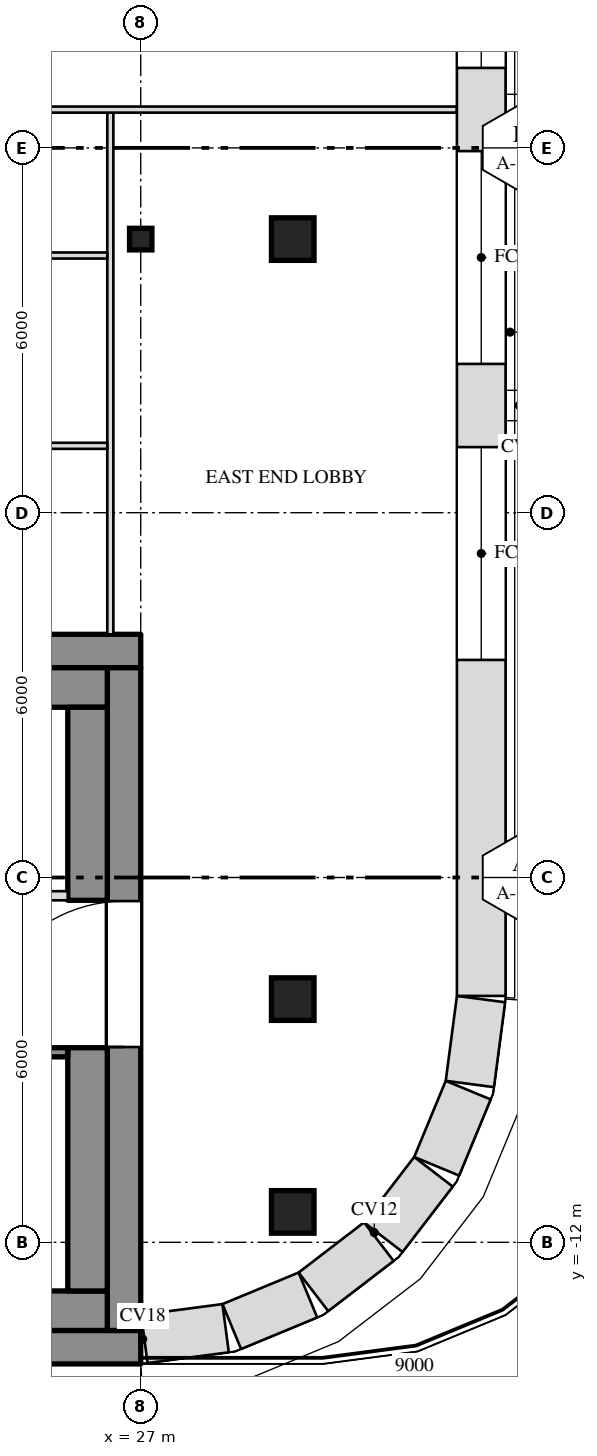
"""IFC4 building model, lengths in metres.
Left out: names, types, materials, properties, quantities, classifications, styles, units other than length and angle.
Written with IfcOpenShell. Run it as: python <this file> out.ifc"""

import sys

from ifc_helpers import new_model, si_unit, direction, frame, frame_2d, origin, origin_2d, place, context, subcontext, project, spatial, rectangle, i_section, extrude, element, fill, save


model = new_model("IFC4")
c1 = context("Model", 3, precision=1e-05, world=origin(), true_north=direction((0.0, 1.0)))
c2 = subcontext(c1, "Body", "Model", "MODEL_VIEW")
j1 = project(units=[si_unit("LENGTHUNIT", "METRE"), si_unit("PLANEANGLEUNIT", "RADIAN")], contexts=[c1])
p1 = place(None, origin())
s1 = spatial("IfcSite", under=j1, at=p1, CompositionType="ELEMENT")
p2 = place(p1, origin())
s2 = spatial("IfcBuilding", under=s1, at=p2, CompositionType="ELEMENT")
p3 = place(p2, frame((0.0, 0.0, 284.5)))
s3 = spatial("IfcBuildingStorey", under=s2, at=p3, CompositionType="ELEMENT", Elevation=284.5)
for number, where, z_axis, x_axis in (
    (1, (29.5, -11.5, 0.0), (0.0, 0.0, 1.0), (1.0, 0.0, 0.0)),
    (2, (29.5, -8.0, 0.0), (0.0, 0.0, 1.0), (1.0, 0.0, 0.0)),
):
    element("IfcColumn", number, at=place(p3, frame(where, z_axis=z_axis, x_axis=x_axis)), inside=s3, PredefinedType="COLUMN", context=c2, shape_type="SweptSolid", body=[
        extrude(rectangle(XDim=0.7, YDim=0.7, at=origin_2d()), origin(), (0.0, 0.0, 1.0), 4.0),
    ])
p4 = place(p3, frame((27.0, 4.5, 0.0), z_axis=(0.0, 0.0, 1.0), x_axis=(1.0, 0.0, 0.0)))
e3 = element("IfcColumn", 3, at=p4, inside=s3, PredefinedType="COLUMN", context=c2, shape_type="SweptSolid", body=[
    extrude(i_section(OverallWidth=0.368, OverallDepth=0.356, WebThickness=0.011, FlangeThickness=0.018, at=origin_2d()), origin(), (0.0, 0.0, 1.0), 4.0),
])
p5 = place(p3, frame((29.5, 4.5, 0.0), z_axis=(0.0, 0.0, 1.0), x_axis=(1.0, 0.0, 0.0)))
e4 = element("IfcColumn", 4, at=p5, inside=s3, PredefinedType="COLUMN", context=c2, shape_type="SweptSolid", body=[
    extrude(rectangle(XDim=0.7, YDim=0.7, at=origin_2d()), origin(), (0.0, 0.0, 1.0), 4.0),
])
p6 = place(p3, frame((-27.0, -2.275, 0.0), z_axis=(0.0, 0.0, 1.0), x_axis=(1.0, 0.0, 0.0)))
e5 = element("IfcWall", 5, at=p6, inside=s3, PredefinedType="SHEAR", context=c2, shape_type="SweptSolid", body=[
    extrude(rectangle(XDim=54.0, YDim=0.55, at=frame_2d((27.0, 0.0))), origin(), (0.0, 0.0, 1.0), 3.78),
])
p7 = place(p6, frame((15.15, 0.0, 0.0)))
e6 = element("IfcOpeningElement", 6, at=p7, cuts=e5, PredefinedType="OPENING", context=c2, shape_type="SweptSolid", body=[
    extrude(rectangle(XDim=2.4, YDim=2.1, at=frame_2d((1.2, 1.05))), frame((0.0, 0.287, 0.0), z_axis=(0.0, -1.0, 0.0), x_axis=(1.0, 0.0, 0.0)), (0.0, 0.0, 1.0), 0.574),
])
p8 = place(p6, frame((36.45, 0.0, 0.0)))
e7 = element("IfcOpeningElement", 7, at=p8, cuts=e5, PredefinedType="OPENING", context=c2, shape_type="SweptSolid", body=[
    extrude(rectangle(XDim=2.4, YDim=2.1, at=frame_2d((1.2, 1.05))), frame((0.0, 0.287, 0.0), z_axis=(0.0, -1.0, 0.0), x_axis=(1.0, 0.0, 0.0)), (0.0, 0.0, 1.0), 0.574),
])
p9 = place(p3, frame((-27.0, -13.725, 0.0), z_axis=(0.0, 0.0, 1.0), x_axis=(1.0, 0.0, 0.0)))
e8 = element("IfcWall", 8, at=p9, inside=s3, PredefinedType="SHEAR", context=c2, shape_type="SweptSolid", body=[
    extrude(rectangle(XDim=54.0, YDim=0.55, at=frame_2d((27.0, 0.0))), origin(), (0.0, 0.0, 1.0), 3.78),
])
p10 = place(p3, frame((26.725, -13.45, 0.0), z_axis=(0.0, 0.0, 1.0), x_axis=(0.0, 1.0, 0.0)))
e9 = element("IfcWall", 9, at=p10, inside=s3, PredefinedType="SHEAR", context=c2, shape_type="SweptSolid", body=[
    extrude(rectangle(XDim=10.9, YDim=0.55, at=frame_2d((5.45, 0.0))), origin(), (0.0, 0.0, 1.0), 3.78),
])
p11 = place(p10, frame((4.662, 0.0, 0.0)))
e10 = element("IfcOpeningElement", 10, at=p11, cuts=e9, PredefinedType="OPENING", context=c2, shape_type="SweptSolid", body=[
    extrude(rectangle(XDim=2.4, YDim=2.1, at=frame_2d((1.2, 1.05))), frame((0.0, 0.287, 0.0), z_axis=(0.0, -1.0, 0.0), x_axis=(1.0, 0.0, 0.0)), (0.0, 0.0, 1.0), 0.574),
])
p12 = place(p3, frame((12.0, -2.875, 0.0), z_axis=(0.0, 0.0, 1.0), x_axis=(1.0, 0.0, 0.0)))
e11 = element("IfcWall", 11, at=p12, inside=s3, PredefinedType="SHEAR", context=c2, shape_type="SweptSolid", body=[
    extrude(rectangle(XDim=14.45, YDim=0.65, at=frame_2d((7.225, 0.0))), origin(), (0.0, 0.0, 1.0), 3.78),
])
p13 = place(p3, frame((-26.45, -13.125, 0.0), z_axis=(0.0, 0.0, 1.0), x_axis=(1.0, 0.0, 0.0)))
e12 = element("IfcWall", 12, at=p13, inside=s3, PredefinedType="SHEAR", context=c2, shape_type="SweptSolid", body=[
    extrude(rectangle(XDim=52.9, YDim=0.65, at=frame_2d((26.45, 0.0))), origin(), (0.0, 0.0, 1.0), 3.78),
])
p14 = place(p3, frame((26.125, -12.8, 0.0), z_axis=(0.0, 0.0, 1.0), x_axis=(0.0, 1.0, 0.0)))
e13 = element("IfcWall", 13, at=p14, inside=s3, PredefinedType="SHEAR", context=c2, shape_type="SweptSolid", body=[
    extrude(rectangle(XDim=4.0, YDim=0.65, at=frame_2d((2.0, 0.0))), origin(), (0.0, 0.0, 1.0), 3.78),
])
p15 = place(p3, frame((26.125, -6.375, 0.0), z_axis=(0.0, 0.0, 1.0), x_axis=(0.0, 1.0, 0.0)))
e14 = element("IfcWall", 14, at=p15, inside=s3, PredefinedType="SHEAR", context=c2, shape_type="SweptSolid", body=[
    extrude(rectangle(XDim=3.175, YDim=0.65, at=frame_2d((1.587, 0.0))), origin(), (0.0, 0.0, 1.0), 3.78),
])
p16 = place(p3, frame((26.5, -2.0, 0.0), z_axis=(0.0, 0.0, 1.0), x_axis=(0.0, 1.0, 0.0)))
e15 = element("IfcWall", 15, at=p16, inside=s3, PredefinedType="PARTITIONING", context=c2, shape_type="SweptSolid", body=[
    extrude(rectangle(XDim=8.58, YDim=0.1, at=frame_2d((4.29, 0.0))), origin(), (0.0, 0.0, 1.0), 3.78),
])
for number, where, z_axis, x_axis in (
    (16, (20.95, 1.1, 0.0), (0.0, 0.0, 1.0), (1.0, 0.0, 0.0)),
    (17, (20.95, 4.23, 0.0), (0.0, 0.0, 1.0), (1.0, 0.0, 0.0)),
):
    element("IfcWall", number, at=place(p3, frame(where, z_axis=z_axis, x_axis=x_axis)), inside=s3, PredefinedType="PARTITIONING", context=c2, shape_type="SweptSolid", body=[
        extrude(rectangle(XDim=5.5, YDim=0.1, at=frame_2d((2.75, 0.0))), origin(), (0.0, 0.0, 1.0), 3.78),
    ])
p17 = place(p3, frame((17.45, 6.63, 0.0), z_axis=(0.0, 0.0, 1.0), x_axis=(1.0, 0.0, 0.0)))
e18 = element("IfcWall", 18, at=p17, inside=s3, PredefinedType="PARTITIONING", context=c2, shape_type="SweptSolid", body=[
    extrude(rectangle(XDim=14.75, YDim=0.1, at=frame_2d((7.375, 0.0))), origin(), (0.0, 0.0, 1.0), 3.78),
])
p18 = place(p3, frame((27.059, -13.589, 0.0), z_axis=(0.0, 0.0, 1.0), x_axis=(0.991443199569, 0.13053881426, 0.0)))
e19 = element("IfcWall", 19, at=p18, inside=s3, PredefinedType="SOLIDWALL", context=c2, shape_type="SweptSolid", body=[
    extrude(rectangle(XDim=1.348, YDim=0.8, at=frame_2d((0.674, 0.0))), origin(), (0.0, 0.0, 1.0), 3.78),
])
p19 = place(p3, frame((28.497, -13.386, 0.0), z_axis=(0.0, 0.0, 1.0), x_axis=(0.923847774587, 0.38276009378, 0.0)))
e20 = element("IfcWall", 20, at=p19, inside=s3, PredefinedType="SOLIDWALL", context=c2, shape_type="SweptSolid", body=[
    extrude(rectangle(XDim=1.355, YDim=0.8, at=frame_2d((0.678, 0.0))), origin(), (0.0, 0.0, 1.0), 3.78),
])
for number, where, z_axis, x_axis in (
    (21, (29.84, -12.815, 0.0), (0.0, 0.0, 1.0), (0.793, 0.609, 0.0)),
    (22, (30.989, -11.916, 0.0), (0.0, 0.0, 1.0), (0.609, 0.793, 0.0)),
):
    element("IfcWall", number, at=place(p3, frame(where, z_axis=z_axis, x_axis=x_axis)), inside=s3, PredefinedType="SOLIDWALL", context=c2, shape_type="SweptSolid", body=[
        extrude(rectangle(XDim=1.356, YDim=0.8, at=frame_2d((0.678, 0.0))), origin(), (0.0, 0.0, 1.0), 3.78),
    ])
p20 = place(p3, frame((31.867, -10.75, 0.0), z_axis=(0.0, 0.0, 1.0), x_axis=(0.38276009378, 0.923847774587, 0.0)))
e23 = element("IfcWall", 23, at=p20, inside=s3, PredefinedType="SOLIDWALL", context=c2, shape_type="SweptSolid", body=[
    extrude(rectangle(XDim=1.355, YDim=0.8, at=frame_2d((0.678, 0.0))), origin(), (0.0, 0.0, 1.0), 3.78),
])
p21 = place(p3, frame((32.413, -9.396, 0.0), z_axis=(0.0, 0.0, 1.0), x_axis=(0.130517283865, 0.99144603414, 0.0)))
e24 = element("IfcWall", 24, at=p21, inside=s3, PredefinedType="SOLIDWALL", context=c2, shape_type="SweptSolid", body=[
    extrude(rectangle(XDim=1.408, YDim=0.8, at=frame_2d((0.704, 0.0))), origin(), (0.0, 0.0, 1.0), 3.78),
])
p22 = place(p3, frame((32.6, -7.948, 0.0), z_axis=(0.0, 0.0, 1.0), x_axis=(0.0, 1.0, 0.0)))
e25 = element("IfcWall", 25, at=p22, inside=s3, PredefinedType="SOLIDWALL", context=c2, shape_type="SweptSolid", body=[
    extrude(rectangle(XDim=38.895, YDim=0.8, at=frame_2d((19.448, 0.0))), origin(), (0.0, 0.0, 1.0), 3.78),
])
p23 = place(p22, frame((5.526, 0.0, 1.0)))
e26 = element("IfcOpeningElement", 26, at=p23, cuts=e25, PredefinedType="OPENING", context=c2, shape_type="SweptSolid", body=[
    extrude(rectangle(XDim=3.5, YDim=2.5, at=frame_2d((1.75, 1.25))), frame((0.0, 0.412, 0.0), z_axis=(0.0, -1.0, 0.0), x_axis=(1.0, 0.0, 0.0)), (0.0, 0.0, 1.0), 0.824),
])
p24 = place(p22, frame((10.395, 0.0, 1.0)))
e27 = element("IfcOpeningElement", 27, at=p24, cuts=e25, PredefinedType="OPENING", context=c2, shape_type="SweptSolid", body=[
    extrude(rectangle(XDim=3.5, YDim=2.5, at=frame_2d((1.75, 1.25))), frame((0.0, 0.412, 0.0), z_axis=(0.0, -1.0, 0.0), x_axis=(1.0, 0.0, 0.0)), (0.0, 0.0, 1.0), 0.824),
])
p25 = place(p22, frame((15.263, 0.0, 1.0)))
e28 = element("IfcOpeningElement", 28, at=p25, cuts=e25, PredefinedType="OPENING", context=c2, shape_type="SweptSolid", body=[
    extrude(rectangle(XDim=3.5, YDim=2.5, at=frame_2d((1.75, 1.25))), frame((0.0, 0.412, 0.0), z_axis=(0.0, -1.0, 0.0), x_axis=(1.0, 0.0, 0.0)), (0.0, 0.0, 1.0), 0.824),
])
p26 = place(p22, frame((25.0, 0.0, 1.0)))
e29 = element("IfcOpeningElement", 29, at=p26, cuts=e25, PredefinedType="OPENING", context=c2, shape_type="SweptSolid", body=[
    extrude(rectangle(XDim=3.5, YDim=2.5, at=frame_2d((1.75, 1.25))), frame((0.0, 0.412, 0.0), z_axis=(0.0, -1.0, 0.0), x_axis=(1.0, 0.0, 0.0)), (0.0, 0.0, 1.0), 0.824),
])
p27 = place(p22, frame((29.869, 0.0, 1.0)))
e30 = element("IfcOpeningElement", 30, at=p27, cuts=e25, PredefinedType="OPENING", context=c2, shape_type="SweptSolid", body=[
    extrude(rectangle(XDim=3.5, YDim=2.5, at=frame_2d((1.75, 1.25))), frame((0.0, 0.412, 0.0), z_axis=(0.0, -1.0, 0.0), x_axis=(1.0, 0.0, 0.0)), (0.0, 0.0, 1.0), 0.824),
])
p28 = place(p22, frame((22.016, 0.0, 0.0)))
e31 = element("IfcOpeningElement", 31, at=p28, cuts=e25, PredefinedType="OPENING", context=c2, shape_type="SweptSolid", body=[
    extrude(rectangle(XDim=1.8, YDim=2.4, at=frame_2d((0.9, 1.2))), frame((0.0, 0.412, 0.0), z_axis=(0.0, -1.0, 0.0), x_axis=(1.0, 0.0, 0.0)), (0.0, 0.0, 1.0), 0.824),
])
p29 = place(p3, frame((18.3, -6.3, 0.0), z_axis=(0.0, 0.0, 1.0), x_axis=(1.0, 0.0, 0.0)))
e32 = element("IfcWall", 32, at=p29, inside=s3, PredefinedType="PARTITIONING", context=c2, shape_type="SweptSolid", body=[
    extrude(rectangle(XDim=7.5, YDim=0.15, at=frame_2d((3.75, 0.0))), origin(), (0.0, 0.0, 1.0), 3.78),
])
p30 = place(p29, frame((0.7, 0.0, 0.0)))
e33 = element("IfcOpeningElement", 33, at=p30, cuts=e32, PredefinedType="OPENING", context=c2, shape_type="SweptSolid", body=[
    extrude(rectangle(XDim=1.0, YDim=2.1, at=frame_2d((0.5, 1.05))), frame((0.0, 0.087, 0.0), z_axis=(0.0, -1.0, 0.0), x_axis=(1.0, 0.0, 0.0)), (0.0, 0.0, 1.0), 0.174),
])
p31 = place(p29, frame((3.25, 0.0, 0.0)))
e34 = element("IfcOpeningElement", 34, at=p31, cuts=e32, PredefinedType="OPENING", context=c2, shape_type="SweptSolid", body=[
    extrude(rectangle(XDim=1.0, YDim=2.1, at=frame_2d((0.5, 1.05))), frame((0.0, 0.087, 0.0), z_axis=(0.0, -1.0, 0.0), x_axis=(1.0, 0.0, 0.0)), (0.0, 0.0, 1.0), 0.174),
])
p32 = place(p29, frame((5.75, 0.0, 0.0)))
e35 = element("IfcOpeningElement", 35, at=p32, cuts=e32, PredefinedType="OPENING", context=c2, shape_type="SweptSolid", body=[
    extrude(rectangle(XDim=1.1, YDim=2.1, at=frame_2d((0.55, 1.05))), frame((0.0, 0.087, 0.0), z_axis=(0.0, -1.0, 0.0), x_axis=(1.0, 0.0, 0.0)), (0.0, 0.0, 1.0), 0.174),
])
p33 = place(p3, frame((18.3, -8.875, 0.0), z_axis=(0.0, 0.0, 1.0), x_axis=(1.0, 0.0, 0.0)))
e36 = element("IfcWall", 36, at=p33, inside=s3, PredefinedType="SHEAR", context=c2, shape_type="SweptSolid", body=[
    extrude(rectangle(XDim=7.5, YDim=0.15, at=frame_2d((3.75, 0.0))), origin(), (0.0, 0.0, 1.0), 3.78),
])
p34 = place(p33, frame((0.225, 0.0, 0.0)))
e37 = element("IfcOpeningElement", 37, at=p34, cuts=e36, PredefinedType="OPENING", context=c2, shape_type="SweptSolid", body=[
    extrude(rectangle(XDim=1.4, YDim=2.1, at=frame_2d((0.7, 1.05))), frame((0.0, 0.087, 0.0), z_axis=(0.0, -1.0, 0.0), x_axis=(1.0, 0.0, 0.0)), (0.0, 0.0, 1.0), 0.174),
])
p35 = place(p23, origin())
e38 = element("IfcWindow", 38, at=p35, inside=s3, PartitioningType="SINGLE_PANEL", PredefinedType="WINDOW", context=c2, shape_type="SweptSolid", body=[
    extrude(rectangle(XDim=3.5, YDim=2.5, at=frame_2d((1.75, 1.25))), frame((0.0, 0.03, 0.0), z_axis=(0.0, -1.0, 0.0), x_axis=(1.0, 0.0, 0.0)), (0.0, 0.0, 1.0), 0.06),
])
fill(e26, e38)
p36 = place(p24, origin())
e39 = element("IfcWindow", 39, at=p36, inside=s3, PartitioningType="SINGLE_PANEL", PredefinedType="WINDOW", context=c2, shape_type="SweptSolid", body=[
    extrude(rectangle(XDim=3.5, YDim=2.5, at=frame_2d((1.75, 1.25))), frame((0.0, 0.03, 0.0), z_axis=(0.0, -1.0, 0.0), x_axis=(1.0, 0.0, 0.0)), (0.0, 0.0, 1.0), 0.06),
])
fill(e27, e39)
p37 = place(p25, origin())
e40 = element("IfcWindow", 40, at=p37, inside=s3, PartitioningType="SINGLE_PANEL", PredefinedType="WINDOW", context=c2, shape_type="SweptSolid", body=[
    extrude(rectangle(XDim=3.5, YDim=2.5, at=frame_2d((1.75, 1.25))), frame((0.0, 0.03, 0.0), z_axis=(0.0, -1.0, 0.0), x_axis=(1.0, 0.0, 0.0)), (0.0, 0.0, 1.0), 0.06),
])
fill(e28, e40)
p38 = place(p11, origin())
e41 = element("IfcDoor", 41, at=p38, inside=s3, OperationType="DOUBLE_DOOR_SINGLE_SWING", PredefinedType="DOOR", context=c2, shape_type="SweptSolid", body=[
    extrude(rectangle(XDim=2.4, YDim=2.1, at=frame_2d((1.2, 1.05))), frame((0.0, 0.025, 0.0), z_axis=(0.0, -1.0, 0.0), x_axis=(1.0, 0.0, 0.0)), (0.0, 0.0, 1.0), 0.05),
])
fill(e10, e41)
save(model, sys.argv[1])
